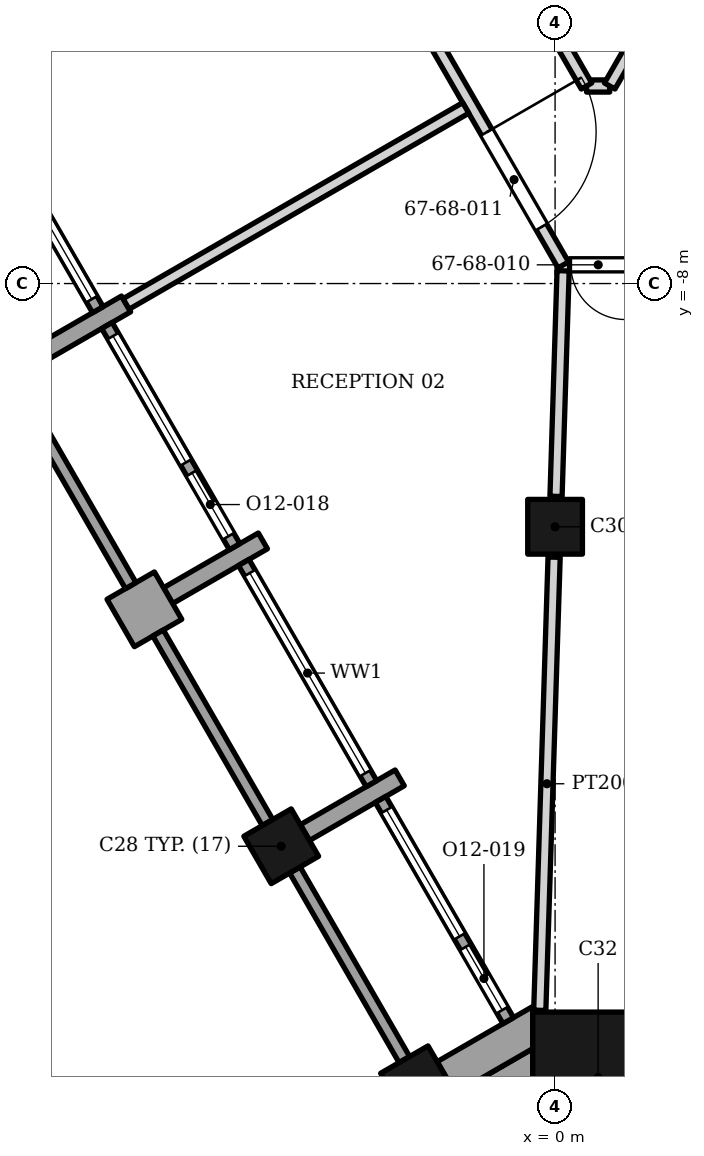
"""IFC4 building model, lengths in metres.
Left out: names, types, materials, properties, quantities, classifications, styles, units other than length and angle.
Written with IfcOpenShell. Run it as: python <this file> out.ifc"""

import sys

from ifc_helpers import new_model, si_unit, direction, frame, frame_2d, origin, origin_2d, place, context, subcontext, project, spatial, polyline, rectangle, outline, extrude, element, fill, save


model = new_model("IFC4")
c1 = context("Model", 3, precision=1e-05, world=origin(), true_north=direction((0.0, 1.0)))
c2 = subcontext(c1, "Body", "Model", "MODEL_VIEW")
j1 = project(units=[si_unit("LENGTHUNIT", "METRE"), si_unit("PLANEANGLEUNIT", "RADIAN")], contexts=[c1])
p1 = place(None, origin())
s1 = spatial("IfcSite", under=j1, at=p1, CompositionType="ELEMENT")
p2 = place(p1, origin())
s2 = spatial("IfcBuilding", under=s1, at=p2, CompositionType="ELEMENT")
p3 = place(p2, frame((0.0, 0.0, 279.4)))
s3 = spatial("IfcBuildingStorey", under=s2, at=p3, CompositionType="ELEMENT", Elevation=279.4)
p4 = place(p3, frame((0.708, -21.056, 0.0), z_axis=(0.0, 0.0, 1.0), x_axis=(0.0, 1.0, 0.0)))
e1 = element("IfcColumn", 1, at=p4, inside=s3, PredefinedType="COLUMN", context=c2, shape_type="SweptSolid", body=[
    extrude(rectangle(XDim=2.15, YDim=2.15, at=origin_2d()), origin(), (0.0, 0.0, 1.0), 3.9),
])
for number, where, z_axis, x_axis in (
    (2, (0.0, -12.0, 0.0), (0.0, 0.0, 1.0), (1.0, 0.0, 0.0)),
    (3, (-4.504, -17.254, 0.0), (0.0, 0.0, 1.0), (0.5, -0.866, 0.0)),
    (4, (-2.254, -21.152, 0.0), (0.0, 0.0, 1.0), (0.5, -0.866, 0.0)),
):
    element("IfcColumn", number, at=place(p3, frame(where, z_axis=z_axis, x_axis=x_axis)), inside=s3, PredefinedType="COLUMN", context=c2, shape_type="SweptSolid", body=[
        extrude(rectangle(XDim=0.9, YDim=0.9, at=origin_2d()), origin(), (0.0, 0.0, 1.0), 3.9),
    ])
p5 = place(p3, frame((-8.614, -9.235, 0.0), z_axis=(0.0, 0.0, 1.0), x_axis=(0.866047807691, 0.499961193289, 0.0)))
e5 = element("IfcWall", 5, at=p5, inside=s3, PredefinedType="SOLIDWALL", context=c2, shape_type="SweptSolid", body=[
    extrude(rectangle(XDim=1.8, YDim=0.3, at=frame_2d((0.9, 0.0))), origin(), (0.0, 0.0, 1.0), 3.0),
])
p6 = place(p3, frame((-7.144, -13.582, 0.0), z_axis=(0.0, 0.0, 1.0), x_axis=(0.866081705922, 0.499902469156, 0.0)))
e6 = element("IfcWall", 6, at=p6, inside=s3, PredefinedType="SOLIDWALL", context=c2, shape_type="SweptSolid", body=[
    extrude(rectangle(XDim=0.9, YDim=0.9, at=frame_2d((0.45, 0.0))), origin(), (0.0, 0.0, 1.0), 3.0),
])
p7 = place(p3, frame((-6.364, -13.132, 0.0), z_axis=(0.0, 0.0, 1.0), x_axis=(0.866047807691, 0.499961193289, 0.0)))
e7 = element("IfcWall", 7, at=p7, inside=s3, PredefinedType="SOLIDWALL", context=c2, shape_type="SweptSolid", body=[
    extrude(rectangle(XDim=1.8, YDim=0.3, at=frame_2d((0.9, 0.0))), origin(), (0.0, 0.0, 1.0), 2.95),
])
p8 = place(p3, frame((-4.114, -17.029, 0.0), z_axis=(0.0, 0.0, 1.0), x_axis=(0.866013897511, 0.50001992892, 0.0)))
e8 = element("IfcWall", 8, at=p8, inside=s3, PredefinedType="SOLIDWALL", context=c2, shape_type="SweptSolid", body=[
    extrude(rectangle(XDim=1.8, YDim=0.3, at=frame_2d((0.9, 0.0))), origin(), (0.0, 0.0, 1.0), 3.0),
])
p9 = place(p3, origin())
e9 = element("IfcWall", 9, at=p9, inside=s3, PredefinedType="SOLIDWALL", context=c2, shape_type="SweptSolid", body=[
    extrude(outline(polyline([(-1.639, -21.316), (-0.367, -20.582), (-0.367, -19.981), (-0.332, -19.981), (-0.381, -19.897), (-1.939, -20.797), (-1.639, -21.316)])), origin(), (0.0, 0.0, 1.0), 3.0),
])
p10 = place(p3, frame((-9.62, -4.793, 0.0), z_axis=(0.0, 0.0, 1.0), x_axis=(0.49998411664, -0.866034573852, 0.0)))
e10 = element("IfcWall", 10, at=p10, inside=s3, PredefinedType="ELEMENTEDWALL", context=c2, shape_type="SweptSolid", body=[
    extrude(rectangle(XDim=4.2, YDim=0.2, at=frame_2d((2.1, 0.0))), origin(), (0.0, 0.0, 1.0), 3.0),
])
p11 = place(p10, frame((0.2, 0.0, 0.45)))
e11 = element("IfcOpeningElement", 11, at=p11, cuts=e10, PredefinedType="OPENING", context=c2, shape_type="SweptSolid", body=[
    extrude(rectangle(XDim=3.8, YDim=2.25, at=frame_2d((1.9, 1.125))), frame((0.0, 0.11, 0.0), z_axis=(0.0, -1.0, 0.0), x_axis=(1.0, 0.0, 0.0)), (0.0, 0.0, 1.0), 0.22),
])
p12 = place(p3, frame((-8.779, -9.85, 0.0), z_axis=(0.0, 0.0, 1.0), x_axis=(0.500012057535, -0.866018442252, 0.0)))
e12 = element("IfcWall", 12, at=p12, inside=s3, PredefinedType="SOLIDWALL", context=c2, shape_type="SweptSolid", body=[
    extrude(rectangle(XDim=3.6, YDim=0.2, at=frame_2d((1.8, 0.0))), origin(), (0.0, 0.0, 1.0), 2.95),
])
p13 = place(p3, frame((-7.37, -8.69, 0.0), z_axis=(0.0, 0.0, 1.0), x_axis=(0.49998411664, -0.866034573852, 0.0)))
e13 = element("IfcWall", 13, at=p13, inside=s3, PredefinedType="ELEMENTEDWALL", context=c2, shape_type="SweptSolid", body=[
    extrude(rectangle(XDim=4.2, YDim=0.2, at=frame_2d((2.1, 0.0))), origin(), (0.0, 0.0, 1.0), 2.95),
])
p14 = place(p13, frame((0.2, 0.0, 0.45)))
e14 = element("IfcOpeningElement", 14, at=p14, cuts=e13, PredefinedType="OPENING", context=c2, shape_type="SweptSolid", body=[
    extrude(rectangle(XDim=2.4, YDim=2.25, at=frame_2d((1.2, 1.125))), frame((0.0, 0.11, 0.0), z_axis=(0.0, -1.0, 0.0), x_axis=(1.0, 0.0, 0.0)), (0.0, 0.0, 1.0), 0.22),
])
p15 = place(p13, frame((2.8, 0.0, 0.0)))
e15 = element("IfcOpeningElement", 15, at=p15, cuts=e13, PredefinedType="OPENING", context=c2, shape_type="SweptSolid", body=[
    extrude(rectangle(XDim=1.2, YDim=2.7, at=frame_2d((0.6, 1.35))), frame((0.0, 0.11, 0.0), z_axis=(0.0, -1.0, 0.0), x_axis=(1.0, 0.0, 0.0)), (0.0, 0.0, 1.0), 0.22),
])
p16 = place(p3, frame((-6.529, -13.747, 0.0), z_axis=(0.0, 0.0, 1.0), x_axis=(0.500012057535, -0.866018442252, 0.0)))
e16 = element("IfcWall", 16, at=p16, inside=s3, PredefinedType="SOLIDWALL", context=c2, shape_type="SweptSolid", body=[
    extrude(rectangle(XDim=3.6, YDim=0.2, at=frame_2d((1.8, 0.0))), origin(), (0.0, 0.0, 1.0), 3.0),
])
p17 = place(p3, frame((-5.12, -12.587, 0.0), z_axis=(0.0, 0.0, 1.0), x_axis=(0.499958946799, -0.866049104564, 0.0)))
e17 = element("IfcWall", 17, at=p17, inside=s3, PredefinedType="ELEMENTEDWALL", context=c2, shape_type="SweptSolid", body=[
    extrude(rectangle(XDim=4.2, YDim=0.2, at=frame_2d((2.1, 0.0))), origin(), (0.0, 0.0, 1.0), 3.0),
])
p18 = place(p17, frame((0.2, 0.0, 0.45)))
e18 = element("IfcOpeningElement", 18, at=p18, cuts=e17, PredefinedType="OPENING", context=c2, shape_type="SweptSolid", body=[
    extrude(rectangle(XDim=3.8, YDim=2.25, at=frame_2d((1.9, 1.125))), frame((0.0, 0.11, 0.0), z_axis=(0.0, -1.0, 0.0), x_axis=(1.0, 0.0, 0.0)), (0.0, 0.0, 1.0), 0.22),
])
p19 = place(p3, frame((-4.279, -17.644, 0.0), z_axis=(0.0, 0.0, 1.0), x_axis=(0.500012057535, -0.866018442252, 0.0)))
e19 = element("IfcWall", 19, at=p19, inside=s3, PredefinedType="SOLIDWALL", context=c2, shape_type="SweptSolid", body=[
    extrude(rectangle(XDim=3.6, YDim=0.2, at=frame_2d((1.8, 0.0))), origin(), (0.0, 0.0, 1.0), 3.0),
])
p20 = place(p3, frame((-2.87, -16.484, 0.0), z_axis=(0.0, 0.0, 1.0), x_axis=(0.49998411664, -0.866034573852, 0.0)))
e20 = element("IfcWall", 20, at=p20, inside=s3, PredefinedType="ELEMENTEDWALL", context=c2, shape_type="SweptSolid", body=[
    extrude(rectangle(XDim=4.2, YDim=0.2, at=frame_2d((2.1, 0.0))), origin(), (0.0, 0.0, 1.0), 3.0),
])
p21 = place(p20, frame((0.2, 0.0, 0.45)))
e21 = element("IfcOpeningElement", 21, at=p21, cuts=e20, PredefinedType="OPENING", context=c2, shape_type="SweptSolid", body=[
    extrude(rectangle(XDim=2.4, YDim=2.25, at=frame_2d((1.2, 1.125))), frame((0.0, 0.11, 0.0), z_axis=(0.0, -1.0, 0.0), x_axis=(1.0, 0.0, 0.0)), (0.0, 0.0, 1.0), 0.22),
])
p22 = place(p20, frame((2.8, 0.0, 0.0)))
e22 = element("IfcOpeningElement", 22, at=p22, cuts=e20, PredefinedType="OPENING", context=c2, shape_type="SweptSolid", body=[
    extrude(rectangle(XDim=1.2, YDim=2.7, at=frame_2d((0.6, 1.35))), frame((0.0, 0.11, 0.0), z_axis=(0.0, -1.0, 0.0), x_axis=(1.0, 0.0, 0.0)), (0.0, 0.0, 1.0), 0.22),
])
p23 = place(p3, origin())
e23 = element("IfcWall", 23, at=p23, inside=s3, PredefinedType="SOLIDWALL", context=c2, shape_type="SweptSolid", body=[
    extrude(outline(polyline([(-0.367, -20.62), (-0.384, -20.591), (-1.639, -21.316), (-1.639, -21.317), (-2.418, -21.767), (-1.831, -22.785), (-0.367, -21.94), (-0.367, -20.62)])), origin(), (0.0, 0.0, 1.0), 3.0),
])
p24 = place(p3, origin())
e24 = element("IfcWall", 24, at=p24, inside=s3, PredefinedType="SOLIDWALL", context=c2, shape_type="SweptSolid", body=[
    extrude(outline(polyline([(-0.367, -22.131), (-0.367, -21.94), (-1.441, -22.56), (-1.441, -23.01), (2.856, -23.01), (2.856, -20.66), (1.783, -20.66), (1.783, -22.131), (-0.367, -22.131)])), origin(), (0.0, 0.0, 1.0), 3.0),
])
p25 = place(p3, frame((-0.252, -19.952, 0.0), z_axis=(0.0, 0.0, 1.0), x_axis=(0.031599714418, 0.999500604326, 0.0)))
e25 = element("IfcWall", 25, at=p25, inside=s3, PredefinedType="PARTITIONING", context=c2, shape_type="SweptSolid", body=[
    extrude(rectangle(XDim=7.456, YDim=0.2, at=frame_2d((3.728, 0.0))), origin(), (0.0, 0.0, 1.0), 3.332),
])
p26 = place(p3, frame((0.016, -11.5, 0.0), z_axis=(0.0, 0.0, 1.0), x_axis=(0.031312793596, 0.999509634249, 0.0)))
e26 = element("IfcWall", 26, at=p26, inside=s3, PredefinedType="PARTITIONING", context=c2, shape_type="SweptSolid", body=[
    extrude(rectangle(XDim=3.711, YDim=0.2, at=frame_2d((1.855, 0.0))), origin(), (0.0, 0.0, 1.0), 2.884),
])
p27 = place(p3, frame((-5.885, 2.733, 0.0), z_axis=(0.0, 0.0, 1.0), x_axis=(0.499999199346, -0.866025866042, 0.0)))
e27 = element("IfcWall", 27, at=p27, inside=s3, PredefinedType="PARTITIONING", context=c2, shape_type="SweptSolid", body=[
    extrude(rectangle(XDim=12.04, YDim=0.2, at=frame_2d((6.02, 0.0))), origin(), (0.0, 0.0, 1.0), 2.884),
])
p28 = place(p27, frame((4.0, 0.0, 0.0)))
e28 = element("IfcOpeningElement", 28, at=p28, cuts=e27, PredefinedType="OPENING", context=c2, shape_type="SweptSolid", body=[
    extrude(rectangle(XDim=1.0, YDim=2.4, at=frame_2d((0.5, 1.2))), frame((0.0, 0.11, 0.0), z_axis=(0.0, -1.0, 0.0), x_axis=(1.0, 0.0, 0.0)), (0.0, 0.0, 1.0), 0.22),
])
p29 = place(p27, frame((9.52, 0.0, 0.0)))
e29 = element("IfcOpeningElement", 29, at=p29, cuts=e27, PredefinedType="OPENING", context=c2, shape_type="SweptSolid", body=[
    extrude(rectangle(XDim=1.8, YDim=2.4, at=frame_2d((0.9, 1.2))), frame((0.0, 0.11, 0.0), z_axis=(0.0, -1.0, 0.0), x_axis=(1.0, 0.0, 0.0)), (0.0, 0.0, 1.0), 0.22),
])
p30 = place(p3, frame((0.236, -7.692, 0.0), z_axis=(0.0, 0.0, 1.0), x_axis=(1.0, 0.0, 0.0)))
e30 = element("IfcWall", 30, at=p30, inside=s3, PredefinedType="PARTITIONING", context=c2, shape_type="SweptSolid", body=[
    extrude(rectangle(XDim=1.043, YDim=0.2, at=frame_2d((0.522, 0.0))), origin(), (0.0, 0.0, 1.0), 3.73),
])
p31 = place(p30, frame((0.023, 0.0, 0.0)))
e31 = element("IfcOpeningElement", 31, at=p31, cuts=e30, PredefinedType="OPENING", context=c2, shape_type="SweptSolid", body=[
    extrude(rectangle(XDim=0.9, YDim=2.1, at=frame_2d((0.45, 1.05))), frame((0.0, 0.11, 0.0), z_axis=(0.0, -1.0, 0.0), x_axis=(1.0, 0.0, 0.0)), (0.0, 0.0, 1.0), 0.22),
])
p32 = place(p3, frame((-7.055, -8.336, 0.0), z_axis=(0.0, 0.0, 1.0), x_axis=(0.866129493323, 0.499819668277, 0.0)))
e32 = element("IfcWall", 32, at=p32, inside=s3, PredefinedType="PARTITIONING", context=c2, shape_type="SweptSolid", body=[
    extrude(rectangle(XDim=6.45, YDim=0.2, at=frame_2d((3.225, 0.0))), origin(), (0.0, 0.0, 1.0), 2.884),
])
p33 = place(p3, frame((0.517, -4.751, 0.0), z_axis=(0.0, 0.0, 1.0), x_axis=(1.0, 0.0, 0.0)))
e33 = element("IfcWall", 33, at=p33, inside=s3, PredefinedType="PARTITIONING", context=c2, shape_type="SweptSolid", body=[
    extrude(rectangle(XDim=0.381, YDim=0.2, at=frame_2d((0.19, 0.0))), origin(), (0.0, 0.0, 1.0), 3.73),
])
p34 = place(p3, frame((0.898, -4.751, 0.0), z_axis=(0.0, 0.0, 1.0), x_axis=(0.499141293918, 0.866520610664, 0.0)))
e34 = element("IfcWall", 34, at=p34, inside=s3, PredefinedType="PARTITIONING", context=c2, shape_type="SweptSolid", body=[
    extrude(rectangle(XDim=8.451, YDim=0.2, at=frame_2d((4.226, 0.0))), origin(), (0.0, 0.0, 1.0), 2.884),
])
p35 = place(p3, frame((-4.375, 3.723, 0.0), z_axis=(0.0, 0.0, 1.0), x_axis=(0.499984508542, -0.866034347597, 0.0)))
e35 = element("IfcWall", 35, at=p35, inside=s3, PredefinedType="PARTITIONING", context=c2, shape_type="SweptSolid", body=[
    extrude(rectangle(XDim=9.785, YDim=0.2, at=frame_2d((4.893, 0.0))), origin(), (0.0, 0.0, 1.0), 2.884),
])
p36 = place(p35, frame((4.393, 0.0, 0.0)))
e36 = element("IfcOpeningElement", 36, at=p36, cuts=e35, PredefinedType="OPENING", context=c2, shape_type="SweptSolid", body=[
    extrude(rectangle(XDim=1.0, YDim=2.1, at=frame_2d((0.5, 1.05))), frame((0.0, 0.11, 0.0), z_axis=(0.0, -1.0, 0.0), x_axis=(1.0, 0.0, 0.0)), (0.0, 0.0, 1.0), 0.22),
])
p37 = place(p11, origin())
e37 = element("IfcWindow", 37, at=p37, inside=s3, PartitioningType="SINGLE_PANEL", PredefinedType="WINDOW", context=c2, shape_type="SweptSolid", body=[
    extrude(rectangle(XDim=3.8, YDim=2.25, at=frame_2d((1.9, 1.125))), frame((0.0, 0.03, 0.0), z_axis=(0.0, -1.0, 0.0), x_axis=(1.0, 0.0, 0.0)), (0.0, 0.0, 1.0), 0.06),
])
fill(e11, e37)
p38 = place(p14, origin())
e38 = element("IfcWindow", 38, at=p38, inside=s3, PartitioningType="SINGLE_PANEL", PredefinedType="WINDOW", context=c2, shape_type="SweptSolid", body=[
    extrude(rectangle(XDim=2.4, YDim=2.25, at=frame_2d((1.2, 1.125))), frame((0.0, 0.03, 0.0), z_axis=(0.0, -1.0, 0.0), x_axis=(1.0, 0.0, 0.0)), (0.0, 0.0, 1.0), 0.06),
])
fill(e14, e38)
p39 = place(p15, origin())
e39 = element("IfcDoor", 39, at=p39, inside=s3, OperationType="SINGLE_SWING_LEFT", PredefinedType="DOOR", context=c2, shape_type="SweptSolid", body=[
    extrude(rectangle(XDim=1.2, YDim=2.7, at=frame_2d((0.6, 1.35))), frame((0.0, 0.025, 0.0), z_axis=(0.0, -1.0, 0.0), x_axis=(1.0, 0.0, 0.0)), (0.0, 0.0, 1.0), 0.05),
])
fill(e15, e39)
p40 = place(p18, origin())
e40 = element("IfcWindow", 40, at=p40, inside=s3, PartitioningType="SINGLE_PANEL", PredefinedType="WINDOW", context=c2, shape_type="SweptSolid", body=[
    extrude(rectangle(XDim=3.8, YDim=2.25, at=frame_2d((1.9, 1.125))), frame((0.0, 0.03, 0.0), z_axis=(0.0, -1.0, 0.0), x_axis=(1.0, 0.0, 0.0)), (0.0, 0.0, 1.0), 0.06),
])
fill(e18, e40)
p41 = place(p21, origin())
e41 = element("IfcWindow", 41, at=p41, inside=s3, PartitioningType="SINGLE_PANEL", PredefinedType="WINDOW", context=c2, shape_type="SweptSolid", body=[
    extrude(rectangle(XDim=2.4, YDim=2.25, at=frame_2d((1.2, 1.125))), frame((0.0, 0.03, 0.0), z_axis=(0.0, -1.0, 0.0), x_axis=(1.0, 0.0, 0.0)), (0.0, 0.0, 1.0), 0.06),
])
fill(e21, e41)
p42 = place(p22, origin())
e42 = element("IfcDoor", 42, at=p42, inside=s3, OperationType="SINGLE_SWING_LEFT", PredefinedType="DOOR", context=c2, shape_type="SweptSolid", body=[
    extrude(rectangle(XDim=1.2, YDim=2.7, at=frame_2d((0.6, 1.35))), frame((0.0, 0.025, 0.0), z_axis=(0.0, -1.0, 0.0), x_axis=(1.0, 0.0, 0.0)), (0.0, 0.0, 1.0), 0.05),
])
fill(e22, e42)
p43 = place(p31, origin())
e43 = element("IfcDoor", 43, at=p43, inside=s3, OperationType="SINGLE_SWING_RIGHT", PredefinedType="DOOR", context=c2, shape_type="SweptSolid", body=[
    extrude(rectangle(XDim=0.9, YDim=2.1, at=frame_2d((0.45, 1.05))), frame((0.0, 0.025, 0.0), z_axis=(0.0, -1.0, 0.0), x_axis=(1.0, 0.0, 0.0)), (0.0, 0.0, 1.0), 0.05),
])
fill(e31, e43)
p44 = place(p29, origin())
e44 = element("IfcDoor", 44, at=p44, inside=s3, OperationType="DOUBLE_DOOR_SINGLE_SWING", PredefinedType="DOOR", context=c2, shape_type="SweptSolid", body=[
    extrude(rectangle(XDim=1.8, YDim=2.4, at=frame_2d((0.9, 1.2))), frame((0.0, 0.025, 0.0), z_axis=(0.0, -1.0, 0.0), x_axis=(1.0, 0.0, 0.0)), (0.0, 0.0, 1.0), 0.05),
])
fill(e29, e44)
save(model, sys.argv[1])
